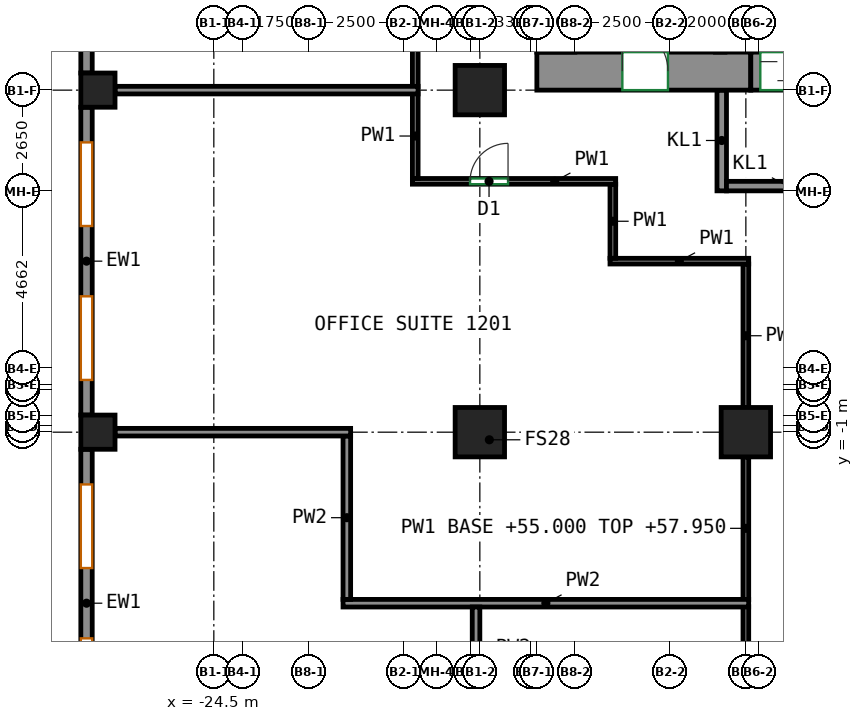
"""IFC4 building model, lengths in metres.
Left out: names, types, materials, properties, quantities, classifications, styles, units other than length and angle.
Written with IfcOpenShell. Run it as: python <this file> out.ifc"""

import sys

from ifc_helpers import new_model, si_unit, direction, frame, frame_2d, origin, origin_2d, place, context, subcontext, project, spatial, rectangle, extrude, source, transform, mapped, element, fill, save


model = new_model("IFC4")
c1 = context("Model", 3, precision=1e-05, world=origin(), true_north=direction((0.0, 1.0)))
c2 = subcontext(c1, "Body", "Model", "MODEL_VIEW")
j1 = project(units=[si_unit("LENGTHUNIT", "METRE"), si_unit("PLANEANGLEUNIT", "RADIAN")], contexts=[c1])
p1 = place(None, origin())
s1 = spatial("IfcSite", under=j1, at=p1, CompositionType="ELEMENT")
p2 = place(p1, origin())
s2 = spatial("IfcBuilding", under=s1, at=p2, CompositionType="ELEMENT")
p3 = place(p2, frame((0.0, 0.0, 55.0)))
s3 = spatial("IfcBuildingStorey", under=s2, at=p3, CompositionType="ELEMENT", Elevation=55.0)
m1 = source(origin(), c2, "Body", "SweptSolid", [
    extrude(rectangle(XDim=0.9, YDim=0.9, at=origin_2d()), origin(), (0.0, 0.0, 1.0), 3.6),
])
for number, where, z_axis, x_axis in (
    (1, (-27.55, -1.0, 0.0), (0.0, 0.0, 1.0), (1.0, 0.0, 0.0)),
    (2, (-27.55, 8.0, 0.0), (0.0, 0.0, 1.0), (1.0, 0.0, 0.0)),
):
    element("IfcColumn", number, at=place(p3, frame(where, z_axis=z_axis, x_axis=x_axis)), inside=s3, PredefinedType="COLUMN", context=c2, shape_type="MappedRepresentation", body=[
        mapped(m1, transform((0.0, 0.0, 0.0))),
    ])
m2 = source(origin(), c2, "Body", "SweptSolid", [
    extrude(rectangle(XDim=1.3, YDim=1.3, at=origin_2d()), origin(), (0.0, 0.0, 1.0), 3.6),
])
for number, where, z_axis, x_axis in (
    (3, (-17.5, -1.0, 0.0), (0.0, 0.0, 1.0), (1.0, 0.0, 0.0)),
    (4, (-17.5, 8.0, 0.0), (0.0, 0.0, 1.0), (1.0, 0.0, 0.0)),
    (5, (-10.5, -1.0, 0.0), (0.0, 0.0, 1.0), (1.0, 0.0, 0.0)),
):
    element("IfcColumn", number, at=place(p3, frame(where, z_axis=z_axis, x_axis=x_axis)), inside=s3, PredefinedType="COLUMN", context=c2, shape_type="MappedRepresentation", body=[
        mapped(m2, transform((0.0, 0.0, 0.0))),
    ])
m3 = source(origin(), c2, "Body", "SweptSolid", [
    extrude(rectangle(XDim=5.63, YDim=1.0, at=frame_2d((2.815, 0.0))), origin(), (0.0, 0.0, 1.0), 3.6),
])
p4 = place(p3, frame((-16.0, 8.5, 0.0), z_axis=(0.0, 0.0, 1.0), x_axis=(1.0, 0.0, 0.0)))
e6 = element("IfcWall", 6, at=p4, inside=s3, PredefinedType="SHEAR", context=c2, shape_type="MappedRepresentation", body=[
    mapped(m3, transform((0.0, 0.0, 0.0))),
])
p5 = place(p4, frame((2.25, 0.0, 0.0)))
e7 = element("IfcOpeningElement", 7, at=p5, cuts=e6, PredefinedType="OPENING", context=c2, shape_type="SweptSolid", body=[
    extrude(rectangle(XDim=1.2, YDim=2.1, at=frame_2d((0.6, 1.05))), frame((0.0, 0.51, 0.0), z_axis=(0.0, -1.0, 0.0), x_axis=(1.0, 0.0, 0.0)), (0.0, 0.0, 1.0), 1.02),
])
m4 = source(origin(), c2, "Body", "SweptSolid", [
    extrude(rectangle(XDim=15.282, YDim=0.3, at=frame_2d((7.641, 0.0))), origin(), (0.0, 0.0, 1.0), 3.6),
])
p6 = place(p3, frame((-27.85, 23.732, 0.0), z_axis=(0.0, 0.0, 1.0), x_axis=(0.0, -1.0, 0.0)))
e8 = element("IfcWall", 8, at=p6, inside=s3, PredefinedType="SOLIDWALL", context=c2, shape_type="MappedRepresentation", body=[
    mapped(m4, transform((0.0, 0.0, 0.0))),
])
p7 = place(p6, frame((0.81, 0.0, 0.7)))
e9 = element("IfcOpeningElement", 9, at=p7, cuts=e8, PredefinedType="OPENING", context=c2, shape_type="SweptSolid", body=[
    extrude(rectangle(XDim=2.2, YDim=2.25, at=frame_2d((1.1, 1.125))), frame((0.0, 0.16, 0.0), z_axis=(0.0, -1.0, 0.0), x_axis=(1.0, 0.0, 0.0)), (0.0, 0.0, 1.0), 0.32),
])
p8 = place(p6, frame((4.631, 0.0, 0.7)))
e10 = element("IfcOpeningElement", 10, at=p8, cuts=e8, PredefinedType="OPENING", context=c2, shape_type="SweptSolid", body=[
    extrude(rectangle(XDim=2.2, YDim=2.25, at=frame_2d((1.1, 1.125))), frame((0.0, 0.16, 0.0), z_axis=(0.0, -1.0, 0.0), x_axis=(1.0, 0.0, 0.0)), (0.0, 0.0, 1.0), 0.32),
])
p9 = place(p6, frame((8.451, 0.0, 0.7)))
e11 = element("IfcOpeningElement", 11, at=p9, cuts=e8, PredefinedType="OPENING", context=c2, shape_type="SweptSolid", body=[
    extrude(rectangle(XDim=2.2, YDim=2.25, at=frame_2d((1.1, 1.125))), frame((0.0, 0.16, 0.0), z_axis=(0.0, -1.0, 0.0), x_axis=(1.0, 0.0, 0.0)), (0.0, 0.0, 1.0), 0.32),
])
p10 = place(p6, frame((12.271, 0.0, 0.7)))
e12 = element("IfcOpeningElement", 12, at=p10, cuts=e8, PredefinedType="OPENING", context=c2, shape_type="SweptSolid", body=[
    extrude(rectangle(XDim=2.2, YDim=2.25, at=frame_2d((1.1, 1.125))), frame((0.0, 0.16, 0.0), z_axis=(0.0, -1.0, 0.0), x_axis=(1.0, 0.0, 0.0)), (0.0, 0.0, 1.0), 0.32),
])
m5 = source(origin(), c2, "Body", "SweptSolid", [
    extrude(rectangle(XDim=8.1, YDim=0.3, at=frame_2d((4.05, 0.0))), origin(), (0.0, 0.0, 1.0), 3.6),
])
p11 = place(p3, frame((-27.85, 7.55, 0.0), z_axis=(0.0, 0.0, 1.0), x_axis=(0.0, -1.0, 0.0)))
e13 = element("IfcWall", 13, at=p11, inside=s3, PredefinedType="SOLIDWALL", context=c2, shape_type="MappedRepresentation", body=[
    mapped(m5, transform((0.0, 0.0, 0.0))),
])
p12 = place(p11, frame((0.925, 0.0, 0.7)))
e14 = element("IfcOpeningElement", 14, at=p12, cuts=e13, PredefinedType="OPENING", context=c2, shape_type="SweptSolid", body=[
    extrude(rectangle(XDim=2.2, YDim=2.25, at=frame_2d((1.1, 1.125))), frame((0.0, 0.16, 0.0), z_axis=(0.0, -1.0, 0.0), x_axis=(1.0, 0.0, 0.0)), (0.0, 0.0, 1.0), 0.32),
])
p13 = place(p11, frame((4.975, 0.0, 0.7)))
e15 = element("IfcOpeningElement", 15, at=p13, cuts=e13, PredefinedType="OPENING", context=c2, shape_type="SweptSolid", body=[
    extrude(rectangle(XDim=2.2, YDim=2.25, at=frame_2d((1.1, 1.125))), frame((0.0, 0.16, 0.0), z_axis=(0.0, -1.0, 0.0), x_axis=(1.0, 0.0, 0.0)), (0.0, 0.0, 1.0), 0.32),
])
p14 = place(p3, frame((-27.85, -1.45, 0.0), z_axis=(0.0, 0.0, 1.0), x_axis=(0.0, -1.0, 0.0)))
e16 = element("IfcWall", 16, at=p14, inside=s3, PredefinedType="SOLIDWALL", context=c2, shape_type="MappedRepresentation", body=[
    mapped(m5, transform((0.0, 0.0, 0.0))),
])
p15 = place(p14, frame((0.925, 0.0, 0.7)))
e17 = element("IfcOpeningElement", 17, at=p15, cuts=e16, PredefinedType="OPENING", context=c2, shape_type="SweptSolid", body=[
    extrude(rectangle(XDim=2.2, YDim=2.25, at=frame_2d((1.1, 1.125))), frame((0.0, 0.16, 0.0), z_axis=(0.0, -1.0, 0.0), x_axis=(1.0, 0.0, 0.0)), (0.0, 0.0, 1.0), 0.32),
])
p16 = place(p14, frame((4.975, 0.0, 0.7)))
e18 = element("IfcOpeningElement", 18, at=p16, cuts=e16, PredefinedType="OPENING", context=c2, shape_type="SweptSolid", body=[
    extrude(rectangle(XDim=2.2, YDim=2.25, at=frame_2d((1.1, 1.125))), frame((0.0, 0.16, 0.0), z_axis=(0.0, -1.0, 0.0), x_axis=(1.0, 0.0, 0.0)), (0.0, 0.0, 1.0), 0.32),
])
m6 = source(origin(), c2, "Body", "SweptSolid", [
    extrude(rectangle(XDim=2.65, YDim=0.25, at=frame_2d((1.325, 0.0))), origin(), (0.0, 0.0, 1.0), 3.6),
])
p17 = place(p3, frame((-11.135, 5.35, 0.0), z_axis=(0.0, 0.0, 1.0), x_axis=(0.0, 1.0, 0.0)))
e19 = element("IfcWall", 19, at=p17, inside=s3, PredefinedType="PARTITIONING", context=c2, shape_type="MappedRepresentation", body=[
    mapped(m6, transform((0.0, 0.0, 0.0))),
])
m7 = source(origin(), c2, "Body", "SweptSolid", [
    extrude(rectangle(XDim=5.36, YDim=0.25, at=frame_2d((2.68, 0.0))), origin(), (0.0, 0.0, 1.0), 3.6),
])
p18 = place(p3, frame((-11.01, 5.475, 0.0), z_axis=(0.0, 0.0, 1.0), x_axis=(1.0, 0.0, 0.0)))
e20 = element("IfcWall", 20, at=p18, inside=s3, PredefinedType="PARTITIONING", context=c2, shape_type="MappedRepresentation", body=[
    mapped(m7, transform((0.0, 0.0, 0.0))),
])
p19 = place(p18, frame((2.28, 0.0, 0.0)))
e21 = element("IfcOpeningElement", 21, at=p19, cuts=e20, PredefinedType="OPENING", context=c2, shape_type="SweptSolid", body=[
    extrude(rectangle(XDim=0.8, YDim=2.0, at=frame_2d((0.4, 1.0))), frame((0.0, 0.135, 0.0), z_axis=(0.0, -1.0, 0.0), x_axis=(1.0, 0.0, 0.0)), (0.0, 0.0, 1.0), 0.27),
])
m8 = source(origin(), c2, "Body", "SweptSolid", [
    extrude(rectangle(XDim=1.4, YDim=1.0, at=frame_2d((0.7, 0.0))), origin(), (0.0, 0.0, 1.0), 2.7),
])
p20 = place(p3, frame((-10.37, 8.5, 0.0), z_axis=(0.0, 0.0, 1.0), x_axis=(1.0, 0.0, 0.0)))
e22 = element("IfcWall", 22, at=p20, inside=s3, PredefinedType="PARTITIONING", context=c2, shape_type="MappedRepresentation", body=[
    mapped(m8, transform((0.0, 0.0, 0.0))),
])
p21 = place(p20, frame((0.25, 0.0, 0.0)))
e23 = element("IfcOpeningElement", 23, at=p21, cuts=e22, PredefinedType="OPENING", context=c2, shape_type="SweptSolid", body=[
    extrude(rectangle(XDim=0.9, YDim=2.1, at=frame_2d((0.45, 1.05))), frame((0.0, 0.51, 0.0), z_axis=(0.0, -1.0, 0.0), x_axis=(1.0, 0.0, 0.0)), (0.0, 0.0, 1.0), 1.02),
])
p22 = place(p3, frame((-10.5, -5.41, 0.0), z_axis=(0.0, 0.0, 1.0), x_axis=(0.0, 1.0, 0.0)))
e24 = element("IfcWall", 24, at=p22, inside=s3, PredefinedType="PARTITIONING", context=c2, shape_type="SweptSolid", body=[
    extrude(rectangle(XDim=3.76, YDim=0.15, at=frame_2d((1.88, 0.0))), origin(), (0.0, 0.0, 1.0), 2.95),
])
p23 = place(p3, frame((-10.5, -0.35, 0.0), z_axis=(0.0, 0.0, 1.0), x_axis=(0.0, 1.0, 0.0)))
e25 = element("IfcWall", 25, at=p23, inside=s3, PredefinedType="PARTITIONING", context=c2, shape_type="SweptSolid", body=[
    extrude(rectangle(XDim=3.775, YDim=0.15, at=frame_2d((1.888, 0.0))), origin(), (0.0, 0.0, 1.0), 3.6),
])
p24 = place(p3, frame((-14.075, 3.5, 0.0), z_axis=(0.0, 0.0, 1.0), x_axis=(1.0, 0.0, 0.0)))
e26 = element("IfcWall", 26, at=p24, inside=s3, PredefinedType="PARTITIONING", context=c2, shape_type="SweptSolid", body=[
    extrude(rectangle(XDim=3.65, YDim=0.15, at=frame_2d((1.825, 0.0))), origin(), (0.0, 0.0, 1.0), 3.6),
])
p25 = place(p3, frame((-14.0, 5.525, 0.0), z_axis=(0.0, 0.0, 1.0), x_axis=(0.0, -1.0, 0.0)))
e27 = element("IfcWall", 27, at=p25, inside=s3, PredefinedType="PARTITIONING", context=c2, shape_type="SweptSolid", body=[
    extrude(rectangle(XDim=1.95, YDim=0.15, at=frame_2d((0.975, 0.0))), origin(), (0.0, 0.0, 1.0), 3.6),
])
p26 = place(p3, frame((-19.275, 5.6, 0.0), z_axis=(0.0, 0.0, 1.0), x_axis=(1.0, 0.0, 0.0)))
e28 = element("IfcWall", 28, at=p26, inside=s3, PredefinedType="PARTITIONING", context=c2, shape_type="SweptSolid", body=[
    extrude(rectangle(XDim=5.35, YDim=0.15, at=frame_2d((2.675, 0.0))), origin(), (0.0, 0.0, 1.0), 3.6),
])
p27 = place(p26, frame((1.517, 0.0, 0.0)))
e29 = element("IfcOpeningElement", 29, at=p27, cuts=e28, PredefinedType="OPENING", context=c2, shape_type="SweptSolid", body=[
    extrude(rectangle(XDim=1.0, YDim=2.1, at=frame_2d((0.5, 1.05))), frame((0.0, 0.085, 0.0), z_axis=(0.0, -1.0, 0.0), x_axis=(1.0, 0.0, 0.0)), (0.0, 0.0, 1.0), 0.17),
])
p28 = place(p3, frame((-19.2, 5.675, 0.0), z_axis=(0.0, 0.0, 1.0), x_axis=(0.0, 1.0, 0.0)))
e30 = element("IfcWall", 30, at=p28, inside=s3, PredefinedType="PARTITIONING", context=c2, shape_type="SweptSolid", body=[
    extrude(rectangle(XDim=2.235, YDim=0.15, at=frame_2d((1.117, 0.0))), origin(), (0.0, 0.0, 1.0), 3.6),
])
p29 = place(p3, frame((-10.5, -9.35, 0.0), z_axis=(0.0, 0.0, 1.0), x_axis=(0.0, 1.0, 0.0)))
e31 = element("IfcWall", 31, at=p29, inside=s3, PredefinedType="PARTITIONING", context=c2, shape_type="SweptSolid", body=[
    extrude(rectangle(XDim=3.76, YDim=0.15, at=frame_2d((1.88, 0.0))), origin(), (0.0, 0.0, 1.0), 2.95),
])
p30 = place(p3, frame((-19.2, 8.09, 0.0), z_axis=(0.0, 0.0, 1.0), x_axis=(0.0, 1.0, 0.0)))
e32 = element("IfcWall", 32, at=p30, inside=s3, PredefinedType="PARTITIONING", context=c2, shape_type="SweptSolid", body=[
    extrude(rectangle(XDim=16.31, YDim=0.15, at=frame_2d((8.155, 0.0))), origin(), (0.0, 0.0, 1.0), 3.6),
])
p31 = place(p30, frame((9.706, 0.0, 0.0)))
e33 = element("IfcOpeningElement", 33, at=p31, cuts=e32, PredefinedType="OPENING", context=c2, shape_type="SweptSolid", body=[
    extrude(rectangle(XDim=1.0, YDim=2.1, at=frame_2d((0.5, 1.05))), frame((0.0, 0.085, 0.0), z_axis=(0.0, -1.0, 0.0), x_axis=(1.0, 0.0, 0.0)), (0.0, 0.0, 1.0), 0.17),
])
p32 = place(p3, frame((-21.1, -5.5, 0.0), z_axis=(0.0, 0.0, 1.0), x_axis=(1.0, 0.0, 0.0)))
e34 = element("IfcWall", 34, at=p32, inside=s3, PredefinedType="PARTITIONING", context=c2, shape_type="SweptSolid", body=[
    extrude(rectangle(XDim=10.674, YDim=0.2, at=frame_2d((5.337, 0.0))), origin(), (0.0, 0.0, 1.0), 3.6),
])
p33 = place(p3, frame((-21.0, -5.4, 0.0), z_axis=(0.0, 0.0, 1.0), x_axis=(0.0, 1.0, 0.0)))
e35 = element("IfcWall", 35, at=p33, inside=s3, PredefinedType="PARTITIONING", context=c2, shape_type="SweptSolid", body=[
    extrude(rectangle(XDim=4.3, YDim=0.2, at=frame_2d((2.15, 0.0))), origin(), (0.0, 0.0, 1.0), 3.6),
])
p34 = place(p3, frame((-27.1, -1.0, 0.0), z_axis=(0.0, 0.0, 1.0), x_axis=(1.0, 0.0, 0.0)))
e36 = element("IfcWall", 36, at=p34, inside=s3, PredefinedType="PARTITIONING", context=c2, shape_type="SweptSolid", body=[
    extrude(rectangle(XDim=6.2, YDim=0.2, at=frame_2d((3.1, 0.0))), origin(), (0.0, 0.0, 1.0), 2.95),
])
p35 = place(p3, frame((-19.126, 8.0, 0.0), z_axis=(0.0, 0.0, 1.0), x_axis=(-1.0, 0.0, 0.0)))
e37 = element("IfcWall", 37, at=p35, inside=s3, PredefinedType="PARTITIONING", context=c2, shape_type="SweptSolid", body=[
    extrude(rectangle(XDim=7.974, YDim=0.2, at=frame_2d((3.987, 0.0))), origin(), (0.0, 0.0, 1.0), 2.95),
])
p36 = place(p3, frame((-17.6, -7.75, 0.0), z_axis=(0.0, 0.0, 1.0), x_axis=(0.0, 1.0, 0.0)))
e38 = element("IfcWall", 38, at=p36, inside=s3, PredefinedType="PARTITIONING", context=c2, shape_type="SweptSolid", body=[
    extrude(rectangle(XDim=2.15, YDim=0.2, at=frame_2d((1.075, 0.0))), origin(), (0.0, 0.0, 1.0), 3.6),
])
p37 = place(p12, origin())
e39 = element("IfcWindow", 39, at=p37, inside=s3, PartitioningType="SINGLE_PANEL", PredefinedType="WINDOW", context=c2, shape_type="SweptSolid", body=[
    extrude(rectangle(XDim=2.2, YDim=2.25, at=frame_2d((1.1, 1.125))), frame((0.0, 0.03, 0.0), z_axis=(0.0, -1.0, 0.0), x_axis=(1.0, 0.0, 0.0)), (0.0, 0.0, 1.0), 0.06),
])
fill(e14, e39)
p38 = place(p13, origin())
e40 = element("IfcWindow", 40, at=p38, inside=s3, PartitioningType="SINGLE_PANEL", PredefinedType="WINDOW", context=c2, shape_type="SweptSolid", body=[
    extrude(rectangle(XDim=2.2, YDim=2.25, at=frame_2d((1.1, 1.125))), frame((0.0, 0.03, 0.0), z_axis=(0.0, -1.0, 0.0), x_axis=(1.0, 0.0, 0.0)), (0.0, 0.0, 1.0), 0.06),
])
fill(e15, e40)
p39 = place(p15, origin())
e41 = element("IfcWindow", 41, at=p39, inside=s3, PartitioningType="SINGLE_PANEL", PredefinedType="WINDOW", context=c2, shape_type="SweptSolid", body=[
    extrude(rectangle(XDim=2.2, YDim=2.25, at=frame_2d((1.1, 1.125))), frame((0.0, 0.03, 0.0), z_axis=(0.0, -1.0, 0.0), x_axis=(1.0, 0.0, 0.0)), (0.0, 0.0, 1.0), 0.06),
])
fill(e17, e41)
p40 = place(p16, origin())
e42 = element("IfcWindow", 42, at=p40, inside=s3, PartitioningType="SINGLE_PANEL", PredefinedType="WINDOW", context=c2, shape_type="SweptSolid", body=[
    extrude(rectangle(XDim=2.2, YDim=2.25, at=frame_2d((1.1, 1.125))), frame((0.0, 0.03, 0.0), z_axis=(0.0, -1.0, 0.0), x_axis=(1.0, 0.0, 0.0)), (0.0, 0.0, 1.0), 0.06),
])
fill(e18, e42)
p41 = place(p21, origin())
e43 = element("IfcDoor", 43, at=p41, inside=s3, OperationType="SLIDING_TO_LEFT", PredefinedType="DOOR", context=c2, shape_type="SweptSolid", body=[
    extrude(rectangle(XDim=0.9, YDim=2.1, at=frame_2d((0.45, 1.05))), frame((0.0, 0.405, 0.0), z_axis=(0.0, -1.0, 0.0), x_axis=(1.0, 0.0, 0.0)), (0.0, 0.0, 1.0), 0.05),
])
fill(e23, e43)
p42 = place(p5, origin())
e44 = element("IfcDoor", 44, at=p42, inside=s3, OperationType="DOUBLE_DOOR_SINGLE_SWING", PredefinedType="DOOR", context=c2, shape_type="SweptSolid", body=[
    extrude(rectangle(XDim=1.2, YDim=2.1, at=frame_2d((0.6, 1.05))), frame((0.0, 0.405, 0.0), z_axis=(0.0, -1.0, 0.0), x_axis=(1.0, 0.0, 0.0)), (0.0, 0.0, 1.0), 0.05),
])
fill(e7, e44)
p43 = place(p27, origin())
e45 = element("IfcDoor", 45, at=p43, inside=s3, OperationType="SINGLE_SWING_RIGHT", PredefinedType="DOOR", context=c2, shape_type="SweptSolid", body=[
    extrude(rectangle(XDim=1.0, YDim=2.1, at=frame_2d((0.5, 1.05))), frame((0.0, 0.025, 0.0), z_axis=(0.0, -1.0, 0.0), x_axis=(1.0, 0.0, 0.0)), (0.0, 0.0, 1.0), 0.05),
])
fill(e29, e45)
save(model, sys.argv[1])
